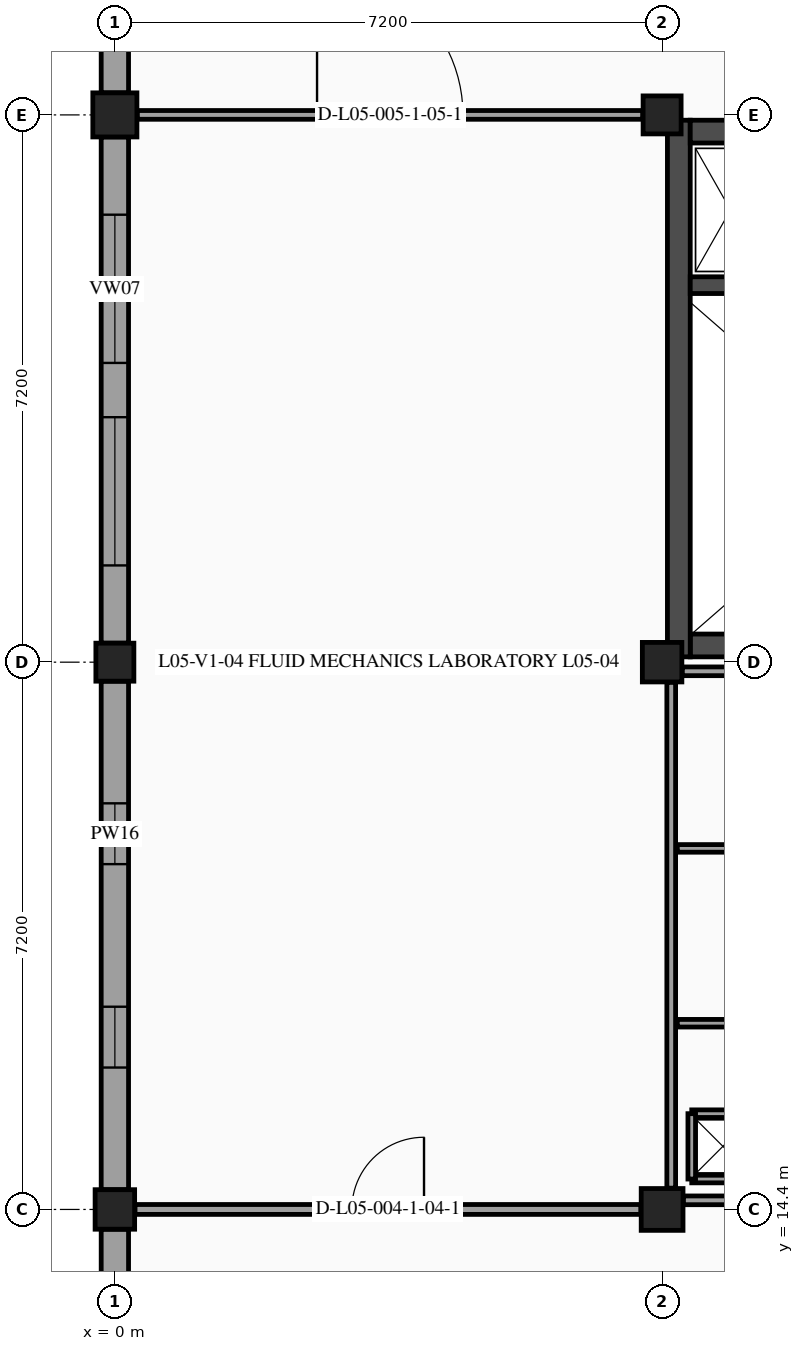
"""IFC4 building model, lengths in metres.
Left out: names, types, materials, properties, quantities, classifications, styles, units other than length and angle.
Written with IfcOpenShell. Run it as: python <this file> out.ifc"""

import sys

from ifc_helpers import new_model, si_unit, direction, frame, frame_2d, origin, origin_2d, place, context, subcontext, project, spatial, rectangle, extrude, element, fill, save


model = new_model("IFC4")
c1 = context("Model", 3, precision=1e-05, world=origin(), true_north=direction((0.0, 1.0)))
c2 = subcontext(c1, "Body", "Model", "MODEL_VIEW")
j1 = project(units=[si_unit("LENGTHUNIT", "METRE"), si_unit("PLANEANGLEUNIT", "RADIAN")], contexts=[c1])
p1 = place(None, origin())
s1 = spatial("IfcSite", under=j1, at=p1, CompositionType="ELEMENT")
p2 = place(p1, origin())
s2 = spatial("IfcBuilding", under=s1, at=p2, CompositionType="ELEMENT")
p3 = place(p2, frame((0.0, 0.0, 22.8)))
s3 = spatial("IfcBuildingStorey", under=s2, at=p3, CompositionType="ELEMENT", Elevation=22.8)
p4 = place(p3, frame((0.0, 14.4, 0.0), z_axis=(0.0, 0.0, 1.0), x_axis=(1.0, 0.0, 0.0)))
e1 = element("IfcColumn", 1, at=p4, inside=s3, PredefinedType="COLUMN", context=c2, shape_type="SweptSolid", body=[
    extrude(rectangle(XDim=0.52, YDim=0.52, at=origin_2d()), origin(), (0.0, 0.0, 1.0), 3.9),
])
p5 = place(p3, frame((0.0, 21.6, 0.0), z_axis=(0.0, 0.0, 1.0), x_axis=(1.0, 0.0, 0.0)))
e2 = element("IfcColumn", 2, at=p5, inside=s3, PredefinedType="COLUMN", context=c2, shape_type="SweptSolid", body=[
    extrude(rectangle(XDim=0.5, YDim=0.5, at=origin_2d()), origin(), (0.0, 0.0, 1.0), 3.9),
])
p6 = place(p3, frame((0.0, 28.8, 0.0), z_axis=(0.0, 0.0, 1.0), x_axis=(1.0, 0.0, 0.0)))
e3 = element("IfcColumn", 3, at=p6, inside=s3, PredefinedType="COLUMN", context=c2, shape_type="SweptSolid", body=[
    extrude(rectangle(XDim=0.58, YDim=0.58, at=origin_2d()), origin(), (0.0, 0.0, 1.0), 3.9),
])
p7 = place(p3, frame((7.2, 14.4, 0.0), z_axis=(0.0, 0.0, 1.0), x_axis=(1.0, 0.0, 0.0)))
e4 = element("IfcColumn", 4, at=p7, inside=s3, PredefinedType="COLUMN", context=c2, shape_type="SweptSolid", body=[
    extrude(rectangle(XDim=0.55, YDim=0.55, at=origin_2d()), origin(), (0.0, 0.0, 1.0), 3.9),
])
p8 = place(p3, frame((7.2, 21.6, 0.0), z_axis=(0.0, 0.0, 1.0), x_axis=(1.0, 0.0, 0.0)))
e5 = element("IfcColumn", 5, at=p8, inside=s3, PredefinedType="COLUMN", context=c2, shape_type="SweptSolid", body=[
    extrude(rectangle(XDim=0.52, YDim=0.52, at=origin_2d()), origin(), (0.0, 0.0, 1.0), 3.9),
])
p9 = place(p3, frame((7.2, 28.8, 0.0), z_axis=(0.0, 0.0, 1.0), x_axis=(1.0, 0.0, 0.0)))
e6 = element("IfcColumn", 6, at=p9, inside=s3, PredefinedType="COLUMN", context=c2, shape_type="SweptSolid", body=[
    extrude(rectangle(XDim=0.5, YDim=0.5, at=origin_2d()), origin(), (0.0, 0.0, 1.0), 3.9),
])
p10 = place(p3, frame((0.0, 7.475, 0.0), z_axis=(0.0, 0.0, 1.0), x_axis=(0.0, 1.0, 0.0)))
e7 = element("IfcWall", 7, at=p10, inside=s3, PredefinedType="STANDARD", context=c2, shape_type="SweptSolid", body=[
    extrude(rectangle(XDim=6.665, YDim=0.36, at=frame_2d((3.333, 0.0))), origin(), (0.0, 0.0, 1.0), 2.865),
])
p11 = place(p10, frame((1.324, 0.0, 1.15)))
e8 = element("IfcOpeningElement", 8, at=p11, cuts=e7, PredefinedType="OPENING", context=c2, shape_type="SweptSolid", body=[
    extrude(rectangle(XDim=1.35, YDim=1.1, at=frame_2d((0.675, 0.55))), frame((0.0, 0.19, 0.0), z_axis=(0.0, -1.0, 0.0), x_axis=(1.0, 0.0, 0.0)), (0.0, 0.0, 1.0), 0.38),
])
p12 = place(p10, frame((3.99, 0.0, 1.15)))
e9 = element("IfcOpeningElement", 9, at=p12, cuts=e7, PredefinedType="OPENING", context=c2, shape_type="SweptSolid", body=[
    extrude(rectangle(XDim=1.35, YDim=1.1, at=frame_2d((0.675, 0.55))), frame((0.0, 0.19, 0.0), z_axis=(0.0, -1.0, 0.0), x_axis=(1.0, 0.0, 0.0)), (0.0, 0.0, 1.0), 0.38),
])
p13 = place(p3, frame((0.0, 14.66, 0.0), z_axis=(0.0, 0.0, 1.0), x_axis=(0.0, 1.0, 0.0)))
e10 = element("IfcWall", 10, at=p13, inside=s3, PredefinedType="STANDARD", context=c2, shape_type="SweptSolid", body=[
    extrude(rectangle(XDim=6.69, YDim=0.36, at=frame_2d((3.345, 0.0))), origin(), (0.0, 0.0, 1.0), 2.865),
])
p14 = place(p13, frame((1.607, 0.0, 1.15)))
e11 = element("IfcOpeningElement", 11, at=p14, cuts=e10, PredefinedType="OPENING", context=c2, shape_type="SweptSolid", body=[
    extrude(rectangle(XDim=0.8, YDim=1.5, at=frame_2d((0.4, 0.75))), frame((0.0, 0.19, 0.0), z_axis=(0.0, -1.0, 0.0), x_axis=(1.0, 0.0, 0.0)), (0.0, 0.0, 1.0), 0.38),
])
p15 = place(p13, frame((4.283, 0.0, 1.15)))
e12 = element("IfcOpeningElement", 12, at=p15, cuts=e10, PredefinedType="OPENING", context=c2, shape_type="SweptSolid", body=[
    extrude(rectangle(XDim=0.8, YDim=1.5, at=frame_2d((0.4, 0.75))), frame((0.0, 0.19, 0.0), z_axis=(0.0, -1.0, 0.0), x_axis=(1.0, 0.0, 0.0)), (0.0, 0.0, 1.0), 0.38),
])
p16 = place(p3, frame((0.0, 21.85, 0.0), z_axis=(0.0, 0.0, 1.0), x_axis=(0.0, 1.0, 0.0)))
e13 = element("IfcWall", 13, at=p16, inside=s3, PredefinedType="STANDARD", context=c2, shape_type="SweptSolid", body=[
    extrude(rectangle(XDim=6.66, YDim=0.36, at=frame_2d((3.33, 0.0))), origin(), (0.0, 0.0, 1.0), 2.865),
])
p17 = place(p16, frame((1.023, 0.0, 1.15)))
e14 = element("IfcOpeningElement", 14, at=p17, cuts=e13, PredefinedType="OPENING", context=c2, shape_type="SweptSolid", body=[
    extrude(rectangle(XDim=1.95, YDim=1.4, at=frame_2d((0.975, 0.7))), frame((0.0, 0.19, 0.0), z_axis=(0.0, -1.0, 0.0), x_axis=(1.0, 0.0, 0.0)), (0.0, 0.0, 1.0), 0.38),
])
p18 = place(p16, frame((3.687, 0.0, 1.15)))
e15 = element("IfcOpeningElement", 15, at=p18, cuts=e13, PredefinedType="OPENING", context=c2, shape_type="SweptSolid", body=[
    extrude(rectangle(XDim=1.95, YDim=1.4, at=frame_2d((0.975, 0.7))), frame((0.0, 0.19, 0.0), z_axis=(0.0, -1.0, 0.0), x_axis=(1.0, 0.0, 0.0)), (0.0, 0.0, 1.0), 0.38),
])
p19 = place(p3, frame((0.0, 29.09, 0.0), z_axis=(0.0, 0.0, 1.0), x_axis=(0.0, 1.0, 0.0)))
e16 = element("IfcWall", 16, at=p19, inside=s3, PredefinedType="STANDARD", context=c2, shape_type="SweptSolid", body=[
    extrude(rectangle(XDim=6.635, YDim=0.36, at=frame_2d((3.317, 0.0))), origin(), (0.0, 0.0, 1.0), 2.865),
])
p20 = place(p19, frame((1.115, 0.0, 1.15)))
e17 = element("IfcOpeningElement", 17, at=p20, cuts=e16, PredefinedType="OPENING", context=c2, shape_type="SweptSolid", body=[
    extrude(rectangle(XDim=1.75, YDim=1.4, at=frame_2d((0.875, 0.7))), frame((0.0, 0.19, 0.0), z_axis=(0.0, -1.0, 0.0), x_axis=(1.0, 0.0, 0.0)), (0.0, 0.0, 1.0), 0.38),
])
p21 = place(p19, frame((3.77, 0.0, 1.15)))
e18 = element("IfcOpeningElement", 18, at=p21, cuts=e16, PredefinedType="OPENING", context=c2, shape_type="SweptSolid", body=[
    extrude(rectangle(XDim=1.75, YDim=1.4, at=frame_2d((0.875, 0.7))), frame((0.0, 0.19, 0.0), z_axis=(0.0, -1.0, 0.0), x_axis=(1.0, 0.0, 0.0)), (0.0, 0.0, 1.0), 0.38),
])
p22 = place(p3, frame((7.57, 21.82, 0.0), z_axis=(0.0, 0.0, 1.0), x_axis=(1.0, 0.0, 0.0)))
e19 = element("IfcWall", 19, at=p22, inside=s3, PredefinedType="SHEAR", context=c2, shape_type="SweptSolid", body=[
    extrude(rectangle(XDim=6.54, YDim=0.3, at=frame_2d((3.27, 0.0))), origin(), (0.0, 0.0, 1.0), 3.67),
])
p23 = place(p3, frame((7.42, 28.73, 0.0), z_axis=(0.0, 0.0, 1.0), x_axis=(0.0, -1.0, 0.0)))
e20 = element("IfcWall", 20, at=p23, inside=s3, PredefinedType="SHEAR", context=c2, shape_type="SweptSolid", body=[
    extrude(rectangle(XDim=7.06, YDim=0.3, at=frame_2d((3.53, 0.0))), origin(), (0.0, 0.0, 1.0), 3.67),
])
p24 = place(p3, frame((7.57, 28.58, 0.0), z_axis=(0.0, 0.0, 1.0), x_axis=(1.0, 0.0, 0.0)))
e21 = element("IfcWall", 21, at=p24, inside=s3, PredefinedType="SHEAR", context=c2, shape_type="SweptSolid", body=[
    extrude(rectangle(XDim=6.54, YDim=0.3, at=frame_2d((3.27, 0.0))), origin(), (0.0, 0.0, 1.0), 3.67),
])
p25 = place(p24, frame((1.42, 0.0, 0.0)))
e22 = element("IfcOpeningElement", 22, at=p25, cuts=e21, PredefinedType="OPENING", context=c2, shape_type="SweptSolid", body=[
    extrude(rectangle(XDim=0.85, YDim=2.1, at=frame_2d((0.425, 1.05))), frame((0.0, 0.16, 0.0), z_axis=(0.0, -1.0, 0.0), x_axis=(1.0, 0.0, 0.0)), (0.0, 0.0, 1.0), 0.32),
])
p26 = place(p3, frame((7.57, 26.56, 0.0), z_axis=(0.0, 0.0, 1.0), x_axis=(1.0, 0.0, 0.0)))
e23 = element("IfcWall", 23, at=p26, inside=s3, PredefinedType="SHEAR", context=c2, shape_type="SweptSolid", body=[
    extrude(rectangle(XDim=6.54, YDim=0.22, at=frame_2d((3.27, 0.0))), origin(), (0.0, 0.0, 1.0), 3.67),
])
p27 = place(p26, frame((5.2, 0.0, 0.0)))
e24 = element("IfcOpeningElement", 24, at=p27, cuts=e23, PredefinedType="OPENING", context=c2, shape_type="SweptSolid", body=[
    extrude(rectangle(XDim=1.2, YDim=2.2, at=frame_2d((0.6, 1.1))), frame((0.0, 0.12, 0.0), z_axis=(0.0, -1.0, 0.0), x_axis=(1.0, 0.0, 0.0)), (0.0, 0.0, 1.0), 0.24),
])
p28 = place(p3, frame((7.48, 14.52, 0.0), z_axis=(0.0, 0.0, 1.0), x_axis=(1.0, 0.0, 0.0)))
e25 = element("IfcWall", 25, at=p28, inside=s3, PredefinedType="PARTITIONING", context=c2, shape_type="SweptSolid", body=[
    extrude(rectangle(XDim=6.625, YDim=0.115, at=frame_2d((3.312, 0.0))), origin(), (0.0, 0.0, 1.0), 3.01),
])
p29 = place(p3, frame((7.465, 21.48, 0.0), z_axis=(0.0, 0.0, 1.0), x_axis=(1.0, 0.0, 0.0)))
e26 = element("IfcWall", 26, at=p29, inside=s3, PredefinedType="PARTITIONING", context=c2, shape_type="SweptSolid", body=[
    extrude(rectangle(XDim=6.655, YDim=0.115, at=frame_2d((3.328, 0.0))), origin(), (0.0, 0.0, 1.0), 3.01),
])
p30 = place(p3, frame((7.32, 14.68, 0.0), z_axis=(0.0, 0.0, 1.0), x_axis=(0.0, 1.0, 0.0)))
e27 = element("IfcWall", 27, at=p30, inside=s3, PredefinedType="PARTITIONING", context=c2, shape_type="SweptSolid", body=[
    extrude(rectangle(XDim=6.655, YDim=0.115, at=frame_2d((3.328, 0.0))), origin(), (0.0, 0.0, 1.0), 3.035),
])
for number, where, z_axis, x_axis in (
    (28, (7.4, 16.85, 0.0), (0.0, 0.0, 1.0), (1.0, 0.0, 0.0)),
    (29, (7.4, 19.15, 0.0), (0.0, 0.0, 1.0), (1.0, 0.0, 0.0)),
):
    element("IfcWall", number, at=place(p3, frame(where, z_axis=z_axis, x_axis=x_axis)), inside=s3, PredefinedType="PARTITIONING", context=c2, shape_type="SweptSolid", body=[
        extrude(rectangle(XDim=6.8, YDim=0.1, at=frame_2d((3.4, 0.0))), origin(), (0.0, 0.0, 1.0), 3.67),
    ])
for number, where, z_axis, x_axis in (
    (30, (7.59, 14.8, 0.0), (0.0, 0.0, 1.0), (1.0, 0.0, 0.0)),
    (31, (8.41, 15.66, 0.0), (0.0, 0.0, 1.0), (-1.0, 0.0, 0.0)),
):
    element("IfcWall", number, at=place(p3, frame(where, z_axis=z_axis, x_axis=x_axis)), inside=s3, PredefinedType="PARTITIONING", context=c2, shape_type="SweptSolid", body=[
        extrude(rectangle(XDim=0.82, YDim=0.1, at=frame_2d((0.41, 0.0))), origin(), (0.0, 0.0, 1.0), 3.67),
    ])
p31 = place(p3, frame((7.59, 15.66, 0.0), z_axis=(0.0, 0.0, 1.0), x_axis=(0.0, -1.0, 0.0)))
e32 = element("IfcWall", 32, at=p31, inside=s3, PredefinedType="PARTITIONING", context=c2, shape_type="SweptSolid", body=[
    extrude(rectangle(XDim=0.86, YDim=0.1, at=frame_2d((0.43, 0.0))), origin(), (0.0, 0.0, 1.0), 3.67),
])
p32 = place(p3, frame((0.265, 14.4, 0.0), z_axis=(0.0, 0.0, 1.0), x_axis=(1.0, 0.0, 0.0)))
e33 = element("IfcWall", 33, at=p32, inside=s3, PredefinedType="PARTITIONING", context=c2, shape_type="SweptSolid", body=[
    extrude(rectangle(XDim=6.655, YDim=0.13, at=frame_2d((3.328, 0.0))), origin(), (0.0, 0.0, 1.0), 2.97),
])
p33 = place(p32, frame((2.853, 0.0, 0.0)))
e34 = element("IfcOpeningElement", 34, at=p33, cuts=e33, PredefinedType="OPENING", context=c2, shape_type="SweptSolid", body=[
    extrude(rectangle(XDim=0.95, YDim=2.15, at=frame_2d((0.475, 1.075))), frame((0.0, 0.075, 0.0), z_axis=(0.0, -1.0, 0.0), x_axis=(1.0, 0.0, 0.0)), (0.0, 0.0, 1.0), 0.15),
])
p34 = place(p3, frame((0.295, 28.8, 0.0), z_axis=(0.0, 0.0, 1.0), x_axis=(1.0, 0.0, 0.0)))
e35 = element("IfcWall", 35, at=p34, inside=s3, PredefinedType="PARTITIONING", context=c2, shape_type="SweptSolid", body=[
    extrude(rectangle(XDim=6.65, YDim=0.115, at=frame_2d((3.325, 0.0))), origin(), (0.0, 0.0, 1.0), 2.97),
])
p35 = place(p34, frame((2.365, 0.0, 0.0)))
e36 = element("IfcOpeningElement", 36, at=p35, cuts=e35, PredefinedType="OPENING", context=c2, shape_type="SweptSolid", body=[
    extrude(rectangle(XDim=1.92, YDim=2.35, at=frame_2d((0.96, 1.175))), frame((0.0, 0.067, 0.0), z_axis=(0.0, -1.0, 0.0), x_axis=(1.0, 0.0, 0.0)), (0.0, 0.0, 1.0), 0.135),
])
p36 = place(p14, origin())
e37 = element("IfcWindow", 37, at=p36, inside=s3, PartitioningType="SINGLE_PANEL", PredefinedType="WINDOW", context=c2, shape_type="SweptSolid", body=[
    extrude(rectangle(XDim=0.8, YDim=1.5, at=frame_2d((0.4, 0.75))), frame((0.0, -0.08, 0.0), z_axis=(0.0, -1.0, 0.0), x_axis=(1.0, 0.0, 0.0)), (0.0, 0.0, 1.0), 0.06),
])
fill(e11, e37)
p37 = place(p15, origin())
e38 = element("IfcWindow", 38, at=p37, inside=s3, PartitioningType="SINGLE_PANEL", PredefinedType="WINDOW", context=c2, shape_type="SweptSolid", body=[
    extrude(rectangle(XDim=0.8, YDim=1.5, at=frame_2d((0.4, 0.75))), frame((0.0, -0.08, 0.0), z_axis=(0.0, -1.0, 0.0), x_axis=(1.0, 0.0, 0.0)), (0.0, 0.0, 1.0), 0.06),
])
fill(e12, e38)
p38 = place(p17, origin())
e39 = element("IfcWindow", 39, at=p38, inside=s3, PartitioningType="SINGLE_PANEL", PredefinedType="WINDOW", context=c2, shape_type="SweptSolid", body=[
    extrude(rectangle(XDim=1.95, YDim=1.4, at=frame_2d((0.975, 0.7))), frame((0.0, -0.08, 0.0), z_axis=(0.0, -1.0, 0.0), x_axis=(1.0, 0.0, 0.0)), (0.0, 0.0, 1.0), 0.06),
])
fill(e14, e39)
p39 = place(p18, origin())
e40 = element("IfcWindow", 40, at=p39, inside=s3, PartitioningType="SINGLE_PANEL", PredefinedType="WINDOW", context=c2, shape_type="SweptSolid", body=[
    extrude(rectangle(XDim=1.95, YDim=1.4, at=frame_2d((0.975, 0.7))), frame((0.0, -0.08, 0.0), z_axis=(0.0, -1.0, 0.0), x_axis=(1.0, 0.0, 0.0)), (0.0, 0.0, 1.0), 0.06),
])
fill(e15, e40)
p40 = place(p33, origin())
e41 = element("IfcDoor", 41, at=p40, inside=s3, OperationType="SINGLE_SWING_RIGHT", PredefinedType="DOOR", context=c2, shape_type="SweptSolid", body=[
    extrude(rectangle(XDim=0.95, YDim=2.15, at=frame_2d((0.475, 1.075))), frame((0.0, 0.025, 0.0), z_axis=(0.0, -1.0, 0.0), x_axis=(1.0, 0.0, 0.0)), (0.0, 0.0, 1.0), 0.05),
])
fill(e34, e41)
p41 = place(p35, origin())
e42 = element("IfcDoor", 42, at=p41, inside=s3, OperationType="SINGLE_SWING_LEFT", PredefinedType="DOOR", context=c2, shape_type="SweptSolid", body=[
    extrude(rectangle(XDim=1.92, YDim=2.35, at=frame_2d((0.96, 1.175))), frame((0.0, 0.025, 0.0), z_axis=(0.0, -1.0, 0.0), x_axis=(1.0, 0.0, 0.0)), (0.0, 0.0, 1.0), 0.05),
])
fill(e36, e42)
save(model, sys.argv[1])
